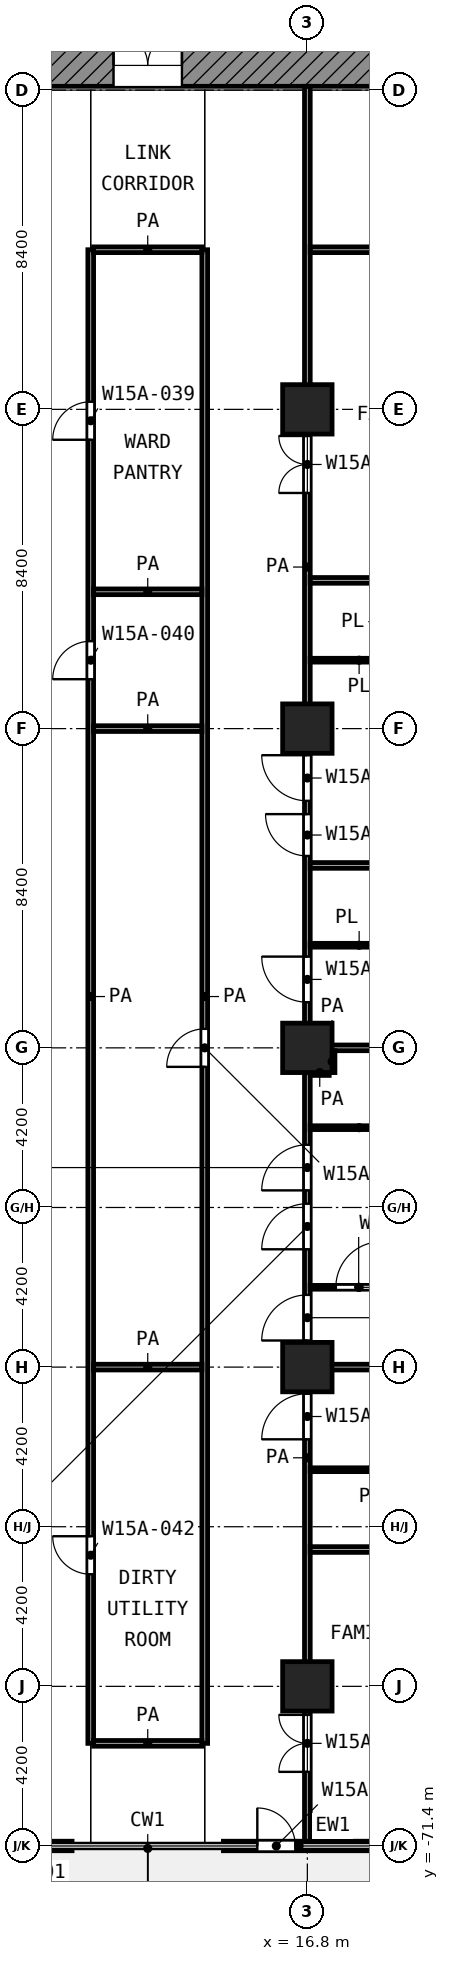
"""IFC4 building model, lengths in metres.
Left out: names, types, materials, properties, quantities, classifications, styles, units other than length and angle.
Written with IfcOpenShell. Run it as: python <this file> out.ifc"""

import sys

from ifc_helpers import new_model, si_unit, direction, frame, frame_2d, origin, origin_2d, place, context, subcontext, project, spatial, rectangle, extrude, element, fill, save


model = new_model("IFC4")
c1 = context("Model", 3, precision=1e-05, world=origin(), true_north=direction((0.0, 1.0)))
c2 = subcontext(c1, "Body", "Model", "MODEL_VIEW")
j1 = project(units=[si_unit("LENGTHUNIT", "METRE"), si_unit("PLANEANGLEUNIT", "RADIAN")], contexts=[c1])
p1 = place(None, origin())
s1 = spatial("IfcSite", under=j1, at=p1, CompositionType="ELEMENT")
p2 = place(p1, origin())
s2 = spatial("IfcBuilding", under=s1, at=p2, CompositionType="ELEMENT")
p3 = place(p2, frame((0.0, 0.0, 68.6)))
s3 = spatial("IfcBuildingStorey", under=s2, at=p3, CompositionType="ELEMENT", Elevation=68.6)
for number, where, z_axis, x_axis in (
    (1, (16.8, -33.6, 0.0), (0.0, 0.0, 1.0), (1.0, 0.0, 0.0)),
    (2, (16.8, -42.0, 0.0), (0.0, 0.0, 1.0), (1.0, 0.0, 0.0)),
    (3, (16.8, -50.4, 0.0), (0.0, 0.0, 1.0), (1.0, 0.0, 0.0)),
    (4, (16.8, -58.8, 0.0), (0.0, 0.0, 1.0), (1.0, 0.0, 0.0)),
    (5, (16.8, -67.2, 0.0), (0.0, 0.0, 1.0), (1.0, 0.0, 0.0)),
):
    element("IfcColumn", number, at=place(p3, frame(where, z_axis=z_axis, x_axis=x_axis)), inside=s3, PredefinedType="COLUMN", context=c2, shape_type="SweptSolid", body=[
        extrude(rectangle(XDim=1.3, YDim=1.3, at=origin_2d()), origin(), (0.0, 0.0, 1.0), 4.2),
    ])
p4 = place(p3, frame((6.625, -71.4, 0.0), z_axis=(0.0, 0.0, 1.0), x_axis=(1.0, 0.0, 0.0)))
e6 = element("IfcWall", 6, at=p4, inside=s3, PredefinedType="SOLIDWALL", context=c2, shape_type="SweptSolid", body=[
    extrude(rectangle(XDim=3.983, YDim=0.25, at=frame_2d((1.992, 0.0))), origin(), (0.0, 0.0, 1.0), 3.78),
])
p5 = place(p4, frame((2.092, 0.0, 0.0)))
e7 = element("IfcOpeningElement", 7, at=p5, cuts=e6, PredefinedType="OPENING", context=c2, shape_type="SweptSolid", body=[
    extrude(rectangle(XDim=1.0, YDim=2.1, at=frame_2d((0.5, 1.05))), frame((0.0, 0.135, 0.0), z_axis=(0.0, -1.0, 0.0), x_axis=(1.0, 0.0, 0.0)), (0.0, 0.0, 1.0), 0.27),
])
p6 = place(p3, frame((14.592, -71.4, 0.0), z_axis=(0.0, 0.0, 1.0), x_axis=(1.0, 0.0, 0.0)))
e8 = element("IfcWall", 8, at=p6, inside=s3, PredefinedType="SOLIDWALL", context=c2, shape_type="SweptSolid", body=[
    extrude(rectangle(XDim=3.983, YDim=0.25, at=frame_2d((1.992, 0.0))), origin(), (0.0, 0.0, 1.0), 3.78),
])
p7 = place(p6, frame((0.892, 0.0, 0.0)))
e9 = element("IfcOpeningElement", 9, at=p7, cuts=e8, PredefinedType="OPENING", context=c2, shape_type="SweptSolid", body=[
    extrude(rectangle(XDim=1.0, YDim=2.1, at=frame_2d((0.5, 1.05))), frame((0.0, 0.135, 0.0), z_axis=(0.0, -1.0, 0.0), x_axis=(1.0, 0.0, 0.0)), (0.0, 0.0, 1.0), 0.27),
])
p8 = place(p3, frame((5.4, -24.55, 0.0), z_axis=(0.0, 0.0, 1.0), x_axis=(1.0, 0.0, 0.0)))
e10 = element("IfcWall", 10, at=p8, inside=s3, PredefinedType="SHEAR", context=c2, shape_type="SweptSolid", body=[
    extrude(rectangle(XDim=18.6, YDim=1.1, at=frame_2d((9.3, 0.0))), origin(), (0.0, 0.0, 1.0), 3.9),
])
p9 = place(p8, frame((6.3, 0.0, 0.0)))
e11 = element("IfcOpeningElement", 11, at=p9, cuts=e10, PredefinedType="OPENING", context=c2, shape_type="SweptSolid", body=[
    extrude(rectangle(XDim=1.8, YDim=2.1, at=frame_2d((0.9, 1.05))), frame((0.0, 0.56, 0.0), z_axis=(0.0, -1.0, 0.0), x_axis=(1.0, 0.0, 0.0)), (0.0, 0.0, 1.0), 1.12),
])
p10 = place(p3, frame((16.875, -61.5, 0.0), z_axis=(0.0, 0.0, 1.0), x_axis=(1.0, 0.0, 0.0)))
e12 = element("IfcWall", 12, at=p10, inside=s3, PredefinedType="PARTITIONING", context=c2, shape_type="SweptSolid", body=[
    extrude(rectangle(XDim=3.175, YDim=0.1, at=frame_2d((1.587, 0.0))), origin(), (0.0, 0.0, 1.0), 3.9),
])
p11 = place(p3, frame((16.875, -56.7, 0.0), z_axis=(0.0, 0.0, 1.0), x_axis=(1.0, 0.0, 0.0)))
e13 = element("IfcWall", 13, at=p11, inside=s3, PredefinedType="PARTITIONING", context=c2, shape_type="SweptSolid", body=[
    extrude(rectangle(XDim=2.575, YDim=0.1, at=frame_2d((1.288, 0.0))), origin(), (0.0, 0.0, 1.0), 3.9),
])
p12 = place(p11, frame((0.675, 0.0, 0.0)))
e14 = element("IfcOpeningElement", 14, at=p12, cuts=e13, PredefinedType="OPENING", context=c2, shape_type="SweptSolid", body=[
    extrude(rectangle(XDim=1.2, YDim=2.1, at=frame_2d((0.6, 1.05))), frame((0.0, 0.06, 0.0), z_axis=(0.0, -1.0, 0.0), x_axis=(1.0, 0.0, 0.0)), (0.0, 0.0, 1.0), 0.12),
])
for number, where, z_axis, x_axis in (
    (15, (16.875, -52.5, 0.0), (0.0, 0.0, 1.0), (1.0, 0.0, 0.0)),
    (16, (16.875, -47.7, 0.0), (0.0, 0.0, 1.0), (1.0, 0.0, 0.0)),
):
    element("IfcWall", number, at=place(p3, frame(where, z_axis=z_axis, x_axis=x_axis)), inside=s3, PredefinedType="PARTITIONING", context=c2, shape_type="SweptSolid", body=[
        extrude(rectangle(XDim=2.575, YDim=0.1, at=frame_2d((1.288, 0.0))), origin(), (0.0, 0.0, 1.0), 3.9),
    ])
p13 = place(p3, frame((16.875, -40.2, 0.0), z_axis=(0.0, 0.0, 1.0), x_axis=(1.0, 0.0, 0.0)))
e17 = element("IfcWall", 17, at=p13, inside=s3, PredefinedType="PARTITIONING", context=c2, shape_type="SweptSolid", body=[
    extrude(rectangle(XDim=2.574, YDim=0.1, at=frame_2d((1.287, 0.0))), origin(), (0.0, 0.0, 1.0), 3.9),
])
p14 = place(p3, frame((11.175, -68.7, 0.0), z_axis=(0.0, 0.0, 1.0), x_axis=(1.0, 0.0, 0.0)))
e18 = element("IfcWall", 18, at=p14, inside=s3, PredefinedType="PARTITIONING", context=c2, shape_type="SweptSolid", body=[
    extrude(rectangle(XDim=2.85, YDim=0.15, at=frame_2d((1.425, 0.0))), origin(), (0.0, 0.0, 1.0), 3.9),
])
p15 = place(p3, frame((16.875, -63.6, 0.0), z_axis=(0.0, 0.0, 1.0), x_axis=(1.0, 0.0, 0.0)))
e19 = element("IfcWall", 19, at=p15, inside=s3, PredefinedType="PARTITIONING", context=c2, shape_type="SweptSolid", body=[
    extrude(rectangle(XDim=8.245, YDim=0.15, at=frame_2d((4.123, 0.0))), origin(), (0.0, 0.0, 1.0), 3.9),
])
p16 = place(p3, frame((11.175, -58.8, 0.0), z_axis=(0.0, 0.0, 1.0), x_axis=(1.0, 0.0, 0.0)))
e20 = element("IfcWall", 20, at=p16, inside=s3, PredefinedType="PARTITIONING", context=c2, shape_type="SweptSolid", body=[
    extrude(rectangle(XDim=2.85, YDim=0.15, at=frame_2d((1.425, 0.0))), origin(), (0.0, 0.0, 1.0), 3.9),
])
p17 = place(p3, frame((16.875, -58.8, 0.0), z_axis=(0.0, 0.0, 1.0), x_axis=(1.0, 0.0, 0.0)))
e21 = element("IfcWall", 21, at=p17, inside=s3, PredefinedType="PARTITIONING", context=c2, shape_type="SweptSolid", body=[
    extrude(rectangle(XDim=8.245, YDim=0.15, at=frame_2d((4.123, 0.0))), origin(), (0.0, 0.0, 1.0), 3.9),
])
p18 = place(p3, frame((16.877, -51.05, 0.0), z_axis=(0.0, 0.0, 1.0), x_axis=(1.0, 0.0, 0.0)))
e22 = element("IfcWall", 22, at=p18, inside=s3, PredefinedType="PARTITIONING", context=c2, shape_type="SweptSolid", body=[
    extrude(rectangle(XDim=0.498, YDim=0.15, at=frame_2d((0.249, 0.0))), origin(), (0.0, 0.0, 1.0), 3.9),
])
p19 = place(p3, frame((16.877, -50.4, 0.0), z_axis=(0.0, 0.0, 1.0), x_axis=(1.0, 0.0, 0.0)))
e23 = element("IfcWall", 23, at=p19, inside=s3, PredefinedType="PARTITIONING", context=c2, shape_type="SweptSolid", body=[
    extrude(rectangle(XDim=8.243, YDim=0.15, at=frame_2d((4.122, 0.0))), origin(), (0.0, 0.0, 1.0), 3.9),
])
p20 = place(p3, frame((16.875, -45.6, 0.0), z_axis=(0.0, 0.0, 1.0), x_axis=(1.0, 0.0, 0.0)))
e24 = element("IfcWall", 24, at=p20, inside=s3, PredefinedType="PARTITIONING", context=c2, shape_type="SweptSolid", body=[
    extrude(rectangle(XDim=8.245, YDim=0.15, at=frame_2d((4.123, 0.0))), origin(), (0.0, 0.0, 1.0), 3.9),
])
for number, where, z_axis, x_axis in (
    (25, (11.175, -42.0, 0.0), (0.0, 0.0, 1.0), (1.0, 0.0, 0.0)),
    (26, (11.175, -38.4, 0.0), (0.0, 0.0, 1.0), (1.0, 0.0, 0.0)),
):
    element("IfcWall", number, at=place(p3, frame(where, z_axis=z_axis, x_axis=x_axis)), inside=s3, PredefinedType="PARTITIONING", context=c2, shape_type="SweptSolid", body=[
        extrude(rectangle(XDim=2.85, YDim=0.15, at=frame_2d((1.425, 0.0))), origin(), (0.0, 0.0, 1.0), 3.9),
    ])
p21 = place(p3, frame((16.875, -38.1, 0.0), z_axis=(0.0, 0.0, 1.0), x_axis=(1.0, 0.0, 0.0)))
e27 = element("IfcWall", 27, at=p21, inside=s3, PredefinedType="PARTITIONING", context=c2, shape_type="SweptSolid", body=[
    extrude(rectangle(XDim=8.245, YDim=0.15, at=frame_2d((4.123, 0.0))), origin(), (0.0, 0.0, 1.0), 3.9),
])
p22 = place(p3, frame((11.175, -29.4, 0.0), z_axis=(0.0, 0.0, 1.0), x_axis=(1.0, 0.0, 0.0)))
e28 = element("IfcWall", 28, at=p22, inside=s3, PredefinedType="PARTITIONING", context=c2, shape_type="SweptSolid", body=[
    extrude(rectangle(XDim=2.85, YDim=0.15, at=frame_2d((1.425, 0.0))), origin(), (0.0, 0.0, 1.0), 3.9),
])
p23 = place(p3, frame((16.875, -29.4, 0.0), z_axis=(0.0, 0.0, 1.0), x_axis=(1.0, 0.0, 0.0)))
e29 = element("IfcWall", 29, at=p23, inside=s3, PredefinedType="PARTITIONING", context=c2, shape_type="SweptSolid", body=[
    extrude(rectangle(XDim=8.25, YDim=0.15, at=frame_2d((4.125, 0.0))), origin(), (0.0, 0.0, 1.0), 3.9),
])
p24 = place(p3, frame((11.1, -68.7, 0.0), z_axis=(0.0, 0.0, 1.0), x_axis=(0.0, 1.0, 0.0)))
e30 = element("IfcWall", 30, at=p24, inside=s3, PredefinedType="PARTITIONING", context=c2, shape_type="SweptSolid", body=[
    extrude(rectangle(XDim=39.3, YDim=0.15, at=frame_2d((19.65, 0.0))), origin(), (0.0, 0.0, 1.0), 3.9),
])
p25 = place(p24, frame((34.3, 0.0, 0.0)))
e31 = element("IfcOpeningElement", 31, at=p25, cuts=e30, PredefinedType="OPENING", context=c2, shape_type="SweptSolid", body=[
    extrude(rectangle(XDim=1.0, YDim=2.1, at=frame_2d((0.5, 1.05))), frame((0.0, 0.085, 0.0), z_axis=(0.0, -1.0, 0.0), x_axis=(1.0, 0.0, 0.0)), (0.0, 0.0, 1.0), 0.17),
])
p26 = place(p24, frame((28.0, 0.0, 0.0)))
e32 = element("IfcOpeningElement", 32, at=p26, cuts=e30, PredefinedType="OPENING", context=c2, shape_type="SweptSolid", body=[
    extrude(rectangle(XDim=1.0, YDim=2.1, at=frame_2d((0.5, 1.05))), frame((0.0, 0.085, 0.0), z_axis=(0.0, -1.0, 0.0), x_axis=(1.0, 0.0, 0.0)), (0.0, 0.0, 1.0), 0.17),
])
p27 = place(p24, frame((4.45, 0.0, 0.0)))
e33 = element("IfcOpeningElement", 33, at=p27, cuts=e30, PredefinedType="OPENING", context=c2, shape_type="SweptSolid", body=[
    extrude(rectangle(XDim=1.0, YDim=2.1, at=frame_2d((0.5, 1.05))), frame((0.0, 0.085, 0.0), z_axis=(0.0, -1.0, 0.0), x_axis=(1.0, 0.0, 0.0)), (0.0, 0.0, 1.0), 0.17),
])
p28 = place(p3, frame((14.1, -68.7, 0.0), z_axis=(0.0, 0.0, 1.0), x_axis=(0.0, 1.0, 0.0)))
e34 = element("IfcWall", 34, at=p28, inside=s3, PredefinedType="PARTITIONING", context=c2, shape_type="SweptSolid", body=[
    extrude(rectangle(XDim=39.3, YDim=0.15, at=frame_2d((19.65, 0.0))), origin(), (0.0, 0.0, 1.0), 3.9),
])
p29 = place(p28, frame((17.8, 0.0, 0.0)))
e35 = element("IfcOpeningElement", 35, at=p29, cuts=e34, PredefinedType="OPENING", context=c2, shape_type="SweptSolid", body=[
    extrude(rectangle(XDim=1.0, YDim=2.1, at=frame_2d((0.5, 1.05))), frame((0.0, 0.085, 0.0), z_axis=(0.0, -1.0, 0.0), x_axis=(1.0, 0.0, 0.0)), (0.0, 0.0, 1.0), 0.17),
])
p30 = place(p3, frame((16.8, -71.32, 0.0), z_axis=(0.0, 0.0, 1.0), x_axis=(0.0, 1.0, 0.0)))
e36 = element("IfcWall", 36, at=p30, inside=s3, PredefinedType="PARTITIONING", context=c2, shape_type="SweptSolid", body=[
    extrude(rectangle(XDim=20.268, YDim=0.15, at=frame_2d((10.134, 0.0))), origin(), (0.0, 0.0, 1.0), 3.9),
])
p31 = place(p30, frame((17.17, 0.0, 0.0)))
e37 = element("IfcOpeningElement", 37, at=p31, cuts=e36, PredefinedType="OPENING", context=c2, shape_type="SweptSolid", body=[
    extrude(rectangle(XDim=1.2, YDim=2.1, at=frame_2d((0.6, 1.05))), frame((0.0, 0.085, 0.0), z_axis=(0.0, -1.0, 0.0), x_axis=(1.0, 0.0, 0.0)), (0.0, 0.0, 1.0), 0.17),
])
p32 = place(p30, frame((15.62, 0.0, 0.0)))
e38 = element("IfcOpeningElement", 38, at=p32, cuts=e36, PredefinedType="OPENING", context=c2, shape_type="SweptSolid", body=[
    extrude(rectangle(XDim=1.2, YDim=2.1, at=frame_2d((0.6, 1.05))), frame((0.0, 0.085, 0.0), z_axis=(0.0, -1.0, 0.0), x_axis=(1.0, 0.0, 0.0)), (0.0, 0.0, 1.0), 0.17),
])
p33 = place(p30, frame((13.22, 0.0, 0.0)))
e39 = element("IfcOpeningElement", 39, at=p33, cuts=e36, PredefinedType="OPENING", context=c2, shape_type="SweptSolid", body=[
    extrude(rectangle(XDim=1.2, YDim=2.1, at=frame_2d((0.6, 1.05))), frame((0.0, 0.085, 0.0), z_axis=(0.0, -1.0, 0.0), x_axis=(1.0, 0.0, 0.0)), (0.0, 0.0, 1.0), 0.17),
])
p34 = place(p30, frame((10.62, 0.0, 0.0)))
e40 = element("IfcOpeningElement", 40, at=p34, cuts=e36, PredefinedType="OPENING", context=c2, shape_type="SweptSolid", body=[
    extrude(rectangle(XDim=1.2, YDim=2.1, at=frame_2d((0.6, 1.05))), frame((0.0, 0.085, 0.0), z_axis=(0.0, -1.0, 0.0), x_axis=(1.0, 0.0, 0.0)), (0.0, 0.0, 1.0), 0.17),
])
p35 = place(p30, frame((1.87, 0.0, 0.0)))
e41 = element("IfcOpeningElement", 41, at=p35, cuts=e36, PredefinedType="OPENING", context=c2, shape_type="SweptSolid", body=[
    extrude(rectangle(XDim=1.5, YDim=2.1, at=frame_2d((0.75, 1.05))), frame((0.0, 0.085, 0.0), z_axis=(0.0, -1.0, 0.0), x_axis=(1.0, 0.0, 0.0)), (0.0, 0.0, 1.0), 0.17),
])
p36 = place(p3, frame((16.8, -50.398, 0.0), z_axis=(0.0, 0.0, 1.0), x_axis=(0.0, 1.0, 0.0)))
e42 = element("IfcWall", 42, at=p36, inside=s3, PredefinedType="PARTITIONING", context=c2, shape_type="SweptSolid", body=[
    extrude(rectangle(XDim=25.298, YDim=0.15, at=frame_2d((12.649, 0.0))), origin(), (0.0, 0.0, 1.0), 3.9),
])
p37 = place(p36, frame((14.598, 0.0, 0.0)))
e43 = element("IfcOpeningElement", 43, at=p37, cuts=e42, PredefinedType="OPENING", context=c2, shape_type="SweptSolid", body=[
    extrude(rectangle(XDim=1.5, YDim=2.1, at=frame_2d((0.75, 1.05))), frame((0.0, 0.085, 0.0), z_axis=(0.0, -1.0, 0.0), x_axis=(1.0, 0.0, 0.0)), (0.0, 0.0, 1.0), 0.17),
])
p38 = place(p36, frame((6.498, 0.0, 0.0)))
e44 = element("IfcOpeningElement", 44, at=p38, cuts=e42, PredefinedType="OPENING", context=c2, shape_type="SweptSolid", body=[
    extrude(rectangle(XDim=1.2, YDim=2.1, at=frame_2d((0.6, 1.05))), frame((0.0, 0.085, 0.0), z_axis=(0.0, -1.0, 0.0), x_axis=(1.0, 0.0, 0.0)), (0.0, 0.0, 1.0), 0.17),
])
p39 = place(p36, frame((5.048, 0.0, 0.0)))
e45 = element("IfcOpeningElement", 45, at=p39, cuts=e42, PredefinedType="OPENING", context=c2, shape_type="SweptSolid", body=[
    extrude(rectangle(XDim=1.1, YDim=2.1, at=frame_2d((0.55, 1.05))), frame((0.0, 0.085, 0.0), z_axis=(0.0, -1.0, 0.0), x_axis=(1.0, 0.0, 0.0)), (0.0, 0.0, 1.0), 0.17),
])
p40 = place(p36, frame((1.199, 0.0, 0.0)))
e46 = element("IfcOpeningElement", 46, at=p40, cuts=e42, PredefinedType="OPENING", context=c2, shape_type="SweptSolid", body=[
    extrude(rectangle(XDim=1.2, YDim=2.1, at=frame_2d((0.6, 1.05))), frame((0.0, 0.085, 0.0), z_axis=(0.0, -1.0, 0.0), x_axis=(1.0, 0.0, 0.0)), (0.0, 0.0, 1.0), 0.17),
])
p41 = place(p3, frame((17.45, -51.05, 0.0), z_axis=(0.0, 0.0, 1.0), x_axis=(0.0, 1.0, 0.0)))
e47 = element("IfcWall", 47, at=p41, inside=s3, PredefinedType="PARTITIONING", context=c2, shape_type="SweptSolid", body=[
    extrude(rectangle(XDim=0.575, YDim=0.15, at=frame_2d((0.288, 0.0))), origin(), (0.0, 0.0, 1.0), 3.9),
])
p42 = place(p7, origin())
e48 = element("IfcDoor", 48, at=p42, inside=s3, OperationType="SINGLE_SWING_LEFT", PredefinedType="DOOR", context=c2, shape_type="SweptSolid", body=[
    extrude(rectangle(XDim=1.0, YDim=2.1, at=frame_2d((0.5, 1.05))), frame((0.0, 0.025, 0.0), z_axis=(0.0, -1.0, 0.0), x_axis=(1.0, 0.0, 0.0)), (0.0, 0.0, 1.0), 0.05),
])
fill(e9, e48)
p43 = place(p9, origin())
e49 = element("IfcDoor", 49, at=p43, inside=s3, OperationType="DOUBLE_DOOR_SINGLE_SWING", PredefinedType="DOOR", context=c2, shape_type="SweptSolid", body=[
    extrude(rectangle(XDim=1.8, YDim=2.1, at=frame_2d((0.9, 1.05))), frame((0.0, 0.025, 0.0), z_axis=(0.0, -1.0, 0.0), x_axis=(1.0, 0.0, 0.0)), (0.0, 0.0, 1.0), 0.05),
])
fill(e11, e49)
p44 = place(p25, origin())
e50 = element("IfcDoor", 50, at=p44, inside=s3, OperationType="SINGLE_SWING_LEFT", PredefinedType="DOOR", context=c2, shape_type="SweptSolid", body=[
    extrude(rectangle(XDim=1.0, YDim=2.1, at=frame_2d((0.5, 1.05))), frame((0.0, 0.025, 0.0), z_axis=(0.0, -1.0, 0.0), x_axis=(1.0, 0.0, 0.0)), (0.0, 0.0, 1.0), 0.05),
])
fill(e31, e50)
p45 = place(p26, origin())
e51 = element("IfcDoor", 51, at=p45, inside=s3, OperationType="SINGLE_SWING_LEFT", PredefinedType="DOOR", context=c2, shape_type="SweptSolid", body=[
    extrude(rectangle(XDim=1.0, YDim=2.1, at=frame_2d((0.5, 1.05))), frame((0.0, 0.025, 0.0), z_axis=(0.0, -1.0, 0.0), x_axis=(1.0, 0.0, 0.0)), (0.0, 0.0, 1.0), 0.05),
])
fill(e32, e51)
p46 = place(p29, origin())
e52 = element("IfcDoor", 52, at=p46, inside=s3, OperationType="SINGLE_SWING_LEFT", PredefinedType="DOOR", context=c2, shape_type="SweptSolid", body=[
    extrude(rectangle(XDim=1.0, YDim=2.1, at=frame_2d((0.5, 1.05))), frame((0.0, 0.025, 0.0), z_axis=(0.0, -1.0, 0.0), x_axis=(1.0, 0.0, 0.0)), (0.0, 0.0, 1.0), 0.05),
])
fill(e35, e52)
p47 = place(p27, origin())
e53 = element("IfcDoor", 53, at=p47, inside=s3, OperationType="SINGLE_SWING_RIGHT", PredefinedType="DOOR", context=c2, shape_type="SweptSolid", body=[
    extrude(rectangle(XDim=1.0, YDim=2.1, at=frame_2d((0.5, 1.05))), frame((0.0, 0.025, 0.0), z_axis=(0.0, -1.0, 0.0), x_axis=(1.0, 0.0, 0.0)), (0.0, 0.0, 1.0), 0.05),
])
fill(e33, e53)
p48 = place(p37, origin())
e54 = element("IfcDoor", 54, at=p48, inside=s3, OperationType="DOUBLE_DOOR_SINGLE_SWING", PredefinedType="DOOR", context=c2, shape_type="SweptSolid", body=[
    extrude(rectangle(XDim=1.5, YDim=2.1, at=frame_2d((0.75, 1.05))), frame((0.0, 0.025, 0.0), z_axis=(0.0, -1.0, 0.0), x_axis=(1.0, 0.0, 0.0)), (0.0, 0.0, 1.0), 0.05),
])
fill(e43, e54)
p49 = place(p38, origin())
e55 = element("IfcDoor", 55, at=p49, inside=s3, OperationType="SINGLE_SWING_RIGHT", PredefinedType="DOOR", context=c2, shape_type="SweptSolid", body=[
    extrude(rectangle(XDim=1.2, YDim=2.1, at=frame_2d((0.6, 1.05))), frame((0.0, 0.025, 0.0), z_axis=(0.0, -1.0, 0.0), x_axis=(1.0, 0.0, 0.0)), (0.0, 0.0, 1.0), 0.05),
])
fill(e44, e55)
p50 = place(p39, origin())
e56 = element("IfcDoor", 56, at=p50, inside=s3, OperationType="SINGLE_SWING_RIGHT", PredefinedType="DOOR", context=c2, shape_type="SweptSolid", body=[
    extrude(rectangle(XDim=1.1, YDim=2.1, at=frame_2d((0.55, 1.05))), frame((0.0, 0.025, 0.0), z_axis=(0.0, -1.0, 0.0), x_axis=(1.0, 0.0, 0.0)), (0.0, 0.0, 1.0), 0.05),
])
fill(e45, e56)
p51 = place(p40, origin())
e57 = element("IfcDoor", 57, at=p51, inside=s3, OperationType="SINGLE_SWING_RIGHT", PredefinedType="DOOR", context=c2, shape_type="SweptSolid", body=[
    extrude(rectangle(XDim=1.2, YDim=2.1, at=frame_2d((0.6, 1.05))), frame((0.0, 0.025, 0.0), z_axis=(0.0, -1.0, 0.0), x_axis=(1.0, 0.0, 0.0)), (0.0, 0.0, 1.0), 0.05),
])
fill(e46, e57)
p52 = place(p31, origin())
e58 = element("IfcDoor", 58, at=p52, inside=s3, OperationType="SINGLE_SWING_LEFT", PredefinedType="DOOR", context=c2, shape_type="SweptSolid", body=[
    extrude(rectangle(XDim=1.2, YDim=2.1, at=frame_2d((0.6, 1.05))), frame((0.0, 0.025, 0.0), z_axis=(0.0, -1.0, 0.0), x_axis=(1.0, 0.0, 0.0)), (0.0, 0.0, 1.0), 0.05),
])
fill(e37, e58)
p53 = place(p32, origin())
e59 = element("IfcDoor", 59, at=p53, inside=s3, OperationType="SINGLE_SWING_LEFT", PredefinedType="DOOR", context=c2, shape_type="SweptSolid", body=[
    extrude(rectangle(XDim=1.2, YDim=2.1, at=frame_2d((0.6, 1.05))), frame((0.0, 0.025, 0.0), z_axis=(0.0, -1.0, 0.0), x_axis=(1.0, 0.0, 0.0)), (0.0, 0.0, 1.0), 0.05),
])
fill(e38, e59)
p54 = place(p33, origin())
e60 = element("IfcDoor", 60, at=p54, inside=s3, OperationType="SINGLE_SWING_LEFT", PredefinedType="DOOR", context=c2, shape_type="SweptSolid", body=[
    extrude(rectangle(XDim=1.2, YDim=2.1, at=frame_2d((0.6, 1.05))), frame((0.0, 0.025, 0.0), z_axis=(0.0, -1.0, 0.0), x_axis=(1.0, 0.0, 0.0)), (0.0, 0.0, 1.0), 0.05),
])
fill(e39, e60)
p55 = place(p12, origin())
e61 = element("IfcDoor", 61, at=p55, inside=s3, OperationType="SINGLE_SWING_RIGHT", PredefinedType="DOOR", context=c2, shape_type="SweptSolid", body=[
    extrude(rectangle(XDim=1.2, YDim=2.1, at=frame_2d((0.6, 1.05))), frame((0.0, 0.025, 0.0), z_axis=(0.0, -1.0, 0.0), x_axis=(1.0, 0.0, 0.0)), (0.0, 0.0, 1.0), 0.05),
])
fill(e14, e61)
p56 = place(p34, origin())
e62 = element("IfcDoor", 62, at=p56, inside=s3, OperationType="SINGLE_SWING_LEFT", PredefinedType="DOOR", context=c2, shape_type="SweptSolid", body=[
    extrude(rectangle(XDim=1.2, YDim=2.1, at=frame_2d((0.6, 1.05))), frame((0.0, 0.025, 0.0), z_axis=(0.0, -1.0, 0.0), x_axis=(1.0, 0.0, 0.0)), (0.0, 0.0, 1.0), 0.05),
])
fill(e40, e62)
p57 = place(p35, origin())
e63 = element("IfcDoor", 63, at=p57, inside=s3, OperationType="DOUBLE_DOOR_SINGLE_SWING", PredefinedType="DOOR", context=c2, shape_type="SweptSolid", body=[
    extrude(rectangle(XDim=1.5, YDim=2.1, at=frame_2d((0.75, 1.05))), frame((0.0, 0.025, 0.0), z_axis=(0.0, -1.0, 0.0), x_axis=(1.0, 0.0, 0.0)), (0.0, 0.0, 1.0), 0.05),
])
fill(e41, e63)
save(model, sys.argv[1])
